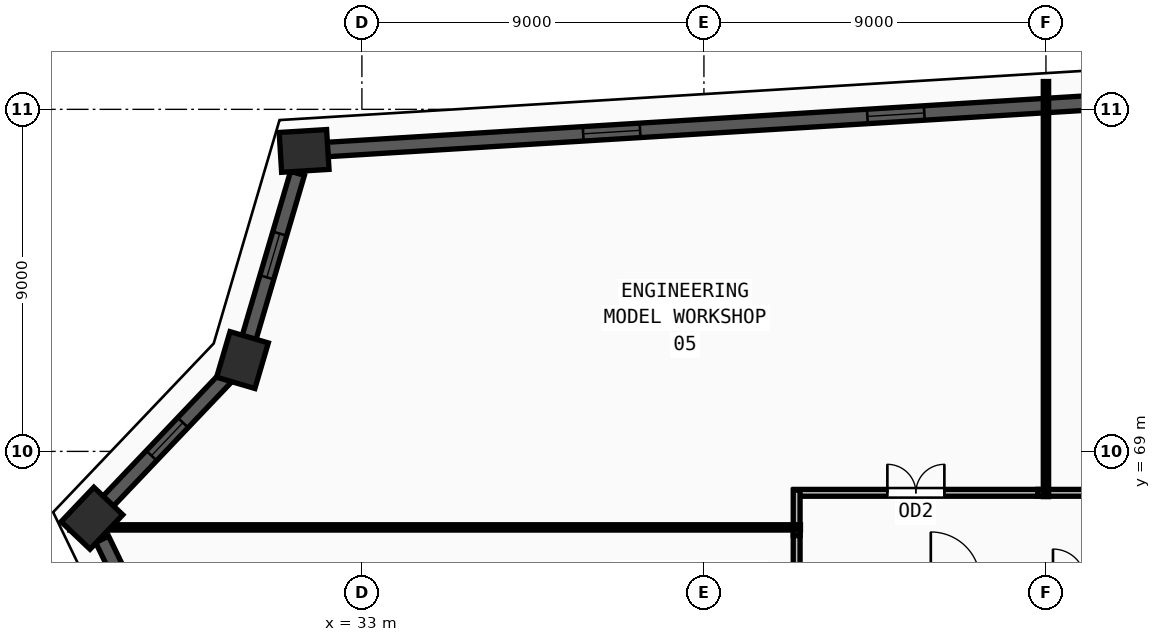
"""IFC4 building model, lengths in metres.
Left out: names, types, materials, properties, quantities, classifications, styles, units other than length and angle.
Written with IfcOpenShell. Run it as: python <this file> out.ifc"""

import sys

from ifc_helpers import new_model, si_unit, direction, frame, frame_2d, origin, origin_2d, place, context, subcontext, project, spatial, rectangle, extrude, source, transform, mapped, element, fill, save


model = new_model("IFC4")
c1 = context("Model", 3, precision=1e-05, world=origin(), true_north=direction((0.0, 1.0)))
c2 = subcontext(c1, "Body", "Model", "MODEL_VIEW")
j1 = project(units=[si_unit("LENGTHUNIT", "METRE"), si_unit("PLANEANGLEUNIT", "RADIAN")], contexts=[c1])
p1 = place(None, origin())
s1 = spatial("IfcSite", under=j1, at=p1, CompositionType="ELEMENT")
p2 = place(p1, origin())
s2 = spatial("IfcBuilding", under=s1, at=p2, CompositionType="ELEMENT")
p3 = place(p2, frame((0.0, 0.0, 194.25)))
s3 = spatial("IfcBuildingStorey", under=s2, at=p3, CompositionType="ELEMENT", Elevation=194.25)
m1 = source(origin(), c2, "Body", "SweptSolid", [
    extrude(rectangle(XDim=1.25, YDim=1.05, at=origin_2d()), origin(), (0.0, 0.0, 1.0), 3.75),
])
for number, where, z_axis, x_axis in (
    (1, (25.896, 67.241, 0.0), (0.0, 0.0, 1.0), (0.689, 0.724, 0.0)),
    (2, (29.857, 71.403, 0.0), (0.0, 0.0, 1.0), (0.283, 0.959, 0.0)),
    (3, (31.479, 76.906, 0.0), (0.0, 0.0, 1.0), (0.998, 0.061, 0.0)),
):
    element("IfcColumn", number, at=place(p3, frame(where, z_axis=z_axis, x_axis=x_axis)), inside=s3, PredefinedType="COLUMN", context=c2, shape_type="MappedRepresentation", body=[
        mapped(m1, transform((0.0, 0.0, 0.0), x_axis=(1.0, 0.0, 0.0), y_axis=(0.0, 1.0, 0.0), z_axis=(0.0, 0.0, 1.0), scale=1.0)),
    ])
p4 = place(p3, frame((62.006, 78.774, 0.0), z_axis=(0.0, 0.0, 1.0), x_axis=(-0.998134246816, -0.061057557539, 0.0)))
e4 = element("IfcWall", 4, at=p4, inside=s3, PredefinedType="SOLIDWALL", context=c2, shape_type="SweptSolid", body=[
    extrude(rectangle(XDim=29.969, YDim=0.38, at=frame_2d((14.984, 0.0))), origin(), (0.0, 0.0, 1.0), 3.57),
])
m2 = source(origin(), c2, "Body", "SweptSolid", [
    extrude(rectangle(XDim=1.5, YDim=1.9, at=frame_2d((0.75, 0.95))), frame((0.0, 0.2, 0.0), z_axis=(0.0, -1.0, 0.0), x_axis=(1.0, 0.0, 0.0)), (0.0, 0.0, 1.0), 0.4),
])
p5 = place(p4, frame((6.742, 0.0, 0.55)))
e5 = element("IfcOpeningElement", 5, at=p5, cuts=e4, PredefinedType="OPENING", context=c2, shape_type="MappedRepresentation", body=[
    mapped(m2, transform((0.0, 0.0, 0.0), x_axis=(1.0, 0.0, 0.0), y_axis=(0.0, 1.0, 0.0), z_axis=(0.0, 0.0, 1.0), scale=1.0)),
])
p6 = place(p4, frame((14.234, 0.0, 0.55)))
e6 = element("IfcOpeningElement", 6, at=p6, cuts=e4, PredefinedType="OPENING", context=c2, shape_type="MappedRepresentation", body=[
    mapped(m2, transform((0.0, 0.0, 0.0), x_axis=(1.0, 0.0, 0.0), y_axis=(0.0, 1.0, 0.0), z_axis=(0.0, 0.0, 1.0), scale=1.0)),
])
p7 = place(p4, frame((21.727, 0.0, 0.55)))
e7 = element("IfcOpeningElement", 7, at=p7, cuts=e4, PredefinedType="OPENING", context=c2, shape_type="MappedRepresentation", body=[
    mapped(m2, transform((0.0, 0.0, 0.0), x_axis=(1.0, 0.0, 0.0), y_axis=(0.0, 1.0, 0.0), z_axis=(0.0, 0.0, 1.0), scale=1.0)),
])
p8 = place(p3, frame((31.305, 76.316, 0.0), z_axis=(0.0, 0.0, 1.0), x_axis=(-0.282667804741, -0.959217864806, 0.0)))
e8 = element("IfcWall", 8, at=p8, inside=s3, PredefinedType="SOLIDWALL", context=c2, shape_type="SweptSolid", body=[
    extrude(rectangle(XDim=4.507, YDim=0.38, at=frame_2d((2.253, 0.0))), origin(), (0.0, 0.0, 1.0), 3.57),
])
m3 = source(origin(), c2, "Body", "SweptSolid", [
    extrude(rectangle(XDim=1.2, YDim=1.9, at=frame_2d((0.6, 0.95))), frame((0.0, 0.2, 0.0), z_axis=(0.0, -1.0, 0.0), x_axis=(1.0, 0.0, 0.0)), (0.0, 0.0, 1.0), 0.4),
])
p9 = place(p8, frame((1.653, 0.0, 0.55)))
e9 = element("IfcOpeningElement", 9, at=p9, cuts=e8, PredefinedType="OPENING", context=c2, shape_type="MappedRepresentation", body=[
    mapped(m3, transform((0.0, 0.0, 0.0), x_axis=(1.0, 0.0, 0.0), y_axis=(0.0, 1.0, 0.0), z_axis=(0.0, 0.0, 1.0), scale=1.0)),
])
p10 = place(p3, frame((29.433, 70.958, 0.0), z_axis=(0.0, 0.0, 1.0), x_axis=(-0.689291978765, -0.724483656137, 0.0)))
e10 = element("IfcWall", 10, at=p10, inside=s3, PredefinedType="SOLIDWALL", context=c2, shape_type="SweptSolid", body=[
    extrude(rectangle(XDim=4.516, YDim=0.38, at=frame_2d((2.258, 0.0))), origin(), (0.0, 0.0, 1.0), 3.57),
])
p11 = place(p10, frame((1.658, 0.0, 0.55)))
e11 = element("IfcOpeningElement", 11, at=p11, cuts=e10, PredefinedType="OPENING", context=c2, shape_type="MappedRepresentation", body=[
    mapped(m3, transform((0.0, 0.0, 0.0), x_axis=(1.0, 0.0, 0.0), y_axis=(0.0, 1.0, 0.0), z_axis=(0.0, 0.0, 1.0), scale=1.0)),
])
p12 = place(p3, frame((26.164, 66.687, 0.0), z_axis=(0.0, 0.0, 1.0), x_axis=(0.43538652966, -0.900243616912, 0.0)))
e12 = element("IfcWall", 12, at=p12, inside=s3, PredefinedType="SOLIDWALL", context=c2, shape_type="SweptSolid", body=[
    extrude(rectangle(XDim=24.737, YDim=0.38, at=frame_2d((12.368, 0.0))), origin(), (0.0, 0.0, 1.0), 3.57),
])
p13 = place(p12, frame((5.434, 0.0, 0.55)))
e13 = element("IfcOpeningElement", 13, at=p13, cuts=e12, PredefinedType="OPENING", context=c2, shape_type="MappedRepresentation", body=[
    mapped(m2, transform((0.0, 0.0, 0.0), x_axis=(1.0, 0.0, 0.0), y_axis=(0.0, 1.0, 0.0), z_axis=(0.0, 0.0, 1.0), scale=1.0)),
])
p14 = place(p12, frame((11.618, 0.0, 0.55)))
e14 = element("IfcOpeningElement", 14, at=p14, cuts=e12, PredefinedType="OPENING", context=c2, shape_type="MappedRepresentation", body=[
    mapped(m2, transform((0.0, 0.0, 0.0), x_axis=(1.0, 0.0, 0.0), y_axis=(0.0, 1.0, 0.0), z_axis=(0.0, 0.0, 1.0), scale=1.0)),
])
p15 = place(p12, frame((15.602, 0.0, 0.55)))
e15 = element("IfcOpeningElement", 15, at=p15, cuts=e12, PredefinedType="OPENING", context=c2, shape_type="MappedRepresentation", body=[
    mapped(m2, transform((0.0, 0.0, 0.0), x_axis=(1.0, 0.0, 0.0), y_axis=(0.0, 1.0, 0.0), z_axis=(0.0, 0.0, 1.0), scale=1.0)),
])
p16 = place(p3, frame((50.785, 67.91, 0.0), z_axis=(0.0, 0.0, 1.0), x_axis=(1.0, 0.0, 0.0)))
e16 = element("IfcWall", 16, at=p16, inside=s3, PredefinedType="PARTITIONING", context=c2, shape_type="SweptSolid", body=[
    extrude(rectangle(XDim=12.425, YDim=0.18, at=frame_2d((6.212, 0.0))), origin(), (0.0, 0.0, 1.0), 3.57),
])
m4 = source(origin(), c2, "Body", "SweptSolid", [
    extrude(rectangle(XDim=1.5, YDim=2.2, at=frame_2d((0.75, 1.1))), frame((0.0, 0.1, 0.0), z_axis=(0.0, -1.0, 0.0), x_axis=(1.0, 0.0, 0.0)), (0.0, 0.0, 1.0), 0.2),
])
p17 = place(p16, frame((5.463, 0.0, 0.0)))
e17 = element("IfcOpeningElement", 17, at=p17, cuts=e16, PredefinedType="OPENING", context=c2, shape_type="MappedRepresentation", body=[
    mapped(m4, transform((0.0, 0.0, 0.0), x_axis=(1.0, 0.0, 0.0), y_axis=(0.0, 1.0, 0.0), z_axis=(0.0, 0.0, 1.0), scale=1.0)),
])
p18 = place(p3, frame((44.37, 67.91, 0.0), z_axis=(0.0, 0.0, 1.0), x_axis=(1.0, 0.0, 0.0)))
e18 = element("IfcWall", 18, at=p18, inside=s3, PredefinedType="PARTITIONING", context=c2, shape_type="SweptSolid", body=[
    extrude(rectangle(XDim=6.415, YDim=0.18, at=frame_2d((3.208, 0.0))), origin(), (0.0, 0.0, 1.0), 3.57),
])
p19 = place(p18, frame((2.457, 0.0, 0.0)))
e19 = element("IfcOpeningElement", 19, at=p19, cuts=e18, PredefinedType="OPENING", context=c2, shape_type="MappedRepresentation", body=[
    mapped(m4, transform((0.0, 0.0, 0.0), x_axis=(1.0, 0.0, 0.0), y_axis=(0.0, 1.0, 0.0), z_axis=(0.0, 0.0, 1.0), scale=1.0)),
])
p20 = place(p3, frame((44.44, 66.785, 0.0), z_axis=(0.0, 0.0, 1.0), x_axis=(0.0, 1.0, 0.0)))
e20 = element("IfcWall", 20, at=p20, inside=s3, PredefinedType="PARTITIONING", context=c2, shape_type="SweptSolid", body=[
    extrude(rectangle(XDim=1.195, YDim=0.18, at=frame_2d((0.598, 0.0))), origin(), (0.0, 0.0, 1.0), 3.57),
])
p21 = place(p3, frame((44.44, 64.98, 0.0), z_axis=(0.0, 0.0, 1.0), x_axis=(0.0, 1.0, 0.0)))
e21 = element("IfcWall", 21, at=p21, inside=s3, PredefinedType="PARTITIONING", context=c2, shape_type="SweptSolid", body=[
    extrude(rectangle(XDim=1.805, YDim=0.18, at=frame_2d((0.902, 0.0))), origin(), (0.0, 0.0, 1.0), 3.57),
])
p22 = place(p3, frame((44.54, 67.0, 0.0), z_axis=(0.0, 0.0, 1.0), x_axis=(-1.0, 0.0, 0.0)))
e22 = element("IfcWall", 22, at=p22, inside=s3, PredefinedType="PARTITIONING", context=c2, shape_type="SweptSolid", body=[
    extrude(rectangle(XDim=19.227, YDim=0.14, at=frame_2d((9.614, 0.0))), origin(), (0.0, 0.0, 1.0), 2.855),
])
p23 = place(p3, frame((51.0, 67.81, 0.0), z_axis=(0.0, 0.0, 1.0), x_axis=(0.0, 1.0, 0.0)))
e23 = element("IfcWall", 23, at=p23, inside=s3, PredefinedType="PARTITIONING", context=c2, shape_type="SweptSolid", body=[
    extrude(rectangle(XDim=10.922, YDim=0.14, at=frame_2d((5.461, 0.0))), origin(), (0.0, 0.0, 1.0), 3.57),
])
m5 = source(origin(), c2, "Body", "SweptSolid", [
    extrude(rectangle(XDim=1.5, YDim=1.9, at=frame_2d((0.75, 0.95))), frame((0.0, 0.03, 0.0), z_axis=(0.0, -1.0, 0.0), x_axis=(1.0, 0.0, 0.0)), (0.0, 0.0, 1.0), 0.06),
])
p24 = place(p6, origin())
e24 = element("IfcWindow", 24, at=p24, inside=s3, PartitioningType="DOUBLE_PANEL_VERTICAL", PredefinedType="WINDOW", context=c2, shape_type="MappedRepresentation", body=[
    mapped(m5, transform((0.0, 0.0, 0.0), x_axis=(1.0, 0.0, 0.0), y_axis=(0.0, 1.0, 0.0), z_axis=(0.0, 0.0, 1.0), scale=1.0)),
])
fill(e6, e24)
p25 = place(p7, origin())
e25 = element("IfcWindow", 25, at=p25, inside=s3, PartitioningType="DOUBLE_PANEL_VERTICAL", PredefinedType="WINDOW", context=c2, shape_type="MappedRepresentation", body=[
    mapped(m5, transform((0.0, 0.0, 0.0), x_axis=(1.0, 0.0, 0.0), y_axis=(0.0, 1.0, 0.0), z_axis=(0.0, 0.0, 1.0), scale=1.0)),
])
fill(e7, e25)
m6 = source(origin(), c2, "Body", "SweptSolid", [
    extrude(rectangle(XDim=1.2, YDim=1.9, at=frame_2d((0.6, 0.95))), frame((0.0, 0.03, 0.0), z_axis=(0.0, -1.0, 0.0), x_axis=(1.0, 0.0, 0.0)), (0.0, 0.0, 1.0), 0.06),
])
p26 = place(p9, origin())
e26 = element("IfcWindow", 26, at=p26, inside=s3, PartitioningType="SINGLE_PANEL", PredefinedType="WINDOW", context=c2, shape_type="MappedRepresentation", body=[
    mapped(m6, transform((0.0, 0.0, 0.0), x_axis=(1.0, 0.0, 0.0), y_axis=(0.0, 1.0, 0.0), z_axis=(0.0, 0.0, 1.0), scale=1.0)),
])
fill(e9, e26)
p27 = place(p11, origin())
e27 = element("IfcWindow", 27, at=p27, inside=s3, PartitioningType="SINGLE_PANEL", PredefinedType="WINDOW", context=c2, shape_type="MappedRepresentation", body=[
    mapped(m6, transform((0.0, 0.0, 0.0), x_axis=(1.0, 0.0, 0.0), y_axis=(0.0, 1.0, 0.0), z_axis=(0.0, 0.0, 1.0), scale=1.0)),
])
fill(e11, e27)
m7 = source(origin(), c2, "Body", "SweptSolid", [
    extrude(rectangle(XDim=1.5, YDim=2.2, at=frame_2d((0.75, 1.1))), frame((0.0, 0.025, 0.0), z_axis=(0.0, -1.0, 0.0), x_axis=(1.0, 0.0, 0.0)), (0.0, 0.0, 1.0), 0.05),
])
p28 = place(p19, origin())
e28 = element("IfcDoor", 28, at=p28, inside=s3, OperationType="DOUBLE_DOOR_SINGLE_SWING", PredefinedType="DOOR", context=c2, shape_type="MappedRepresentation", body=[
    mapped(m7, transform((0.0, 0.0, 0.0), x_axis=(1.0, 0.0, 0.0), y_axis=(0.0, 1.0, 0.0), z_axis=(0.0, 0.0, 1.0), scale=1.0)),
])
fill(e19, e28)
save(model, sys.argv[1])
